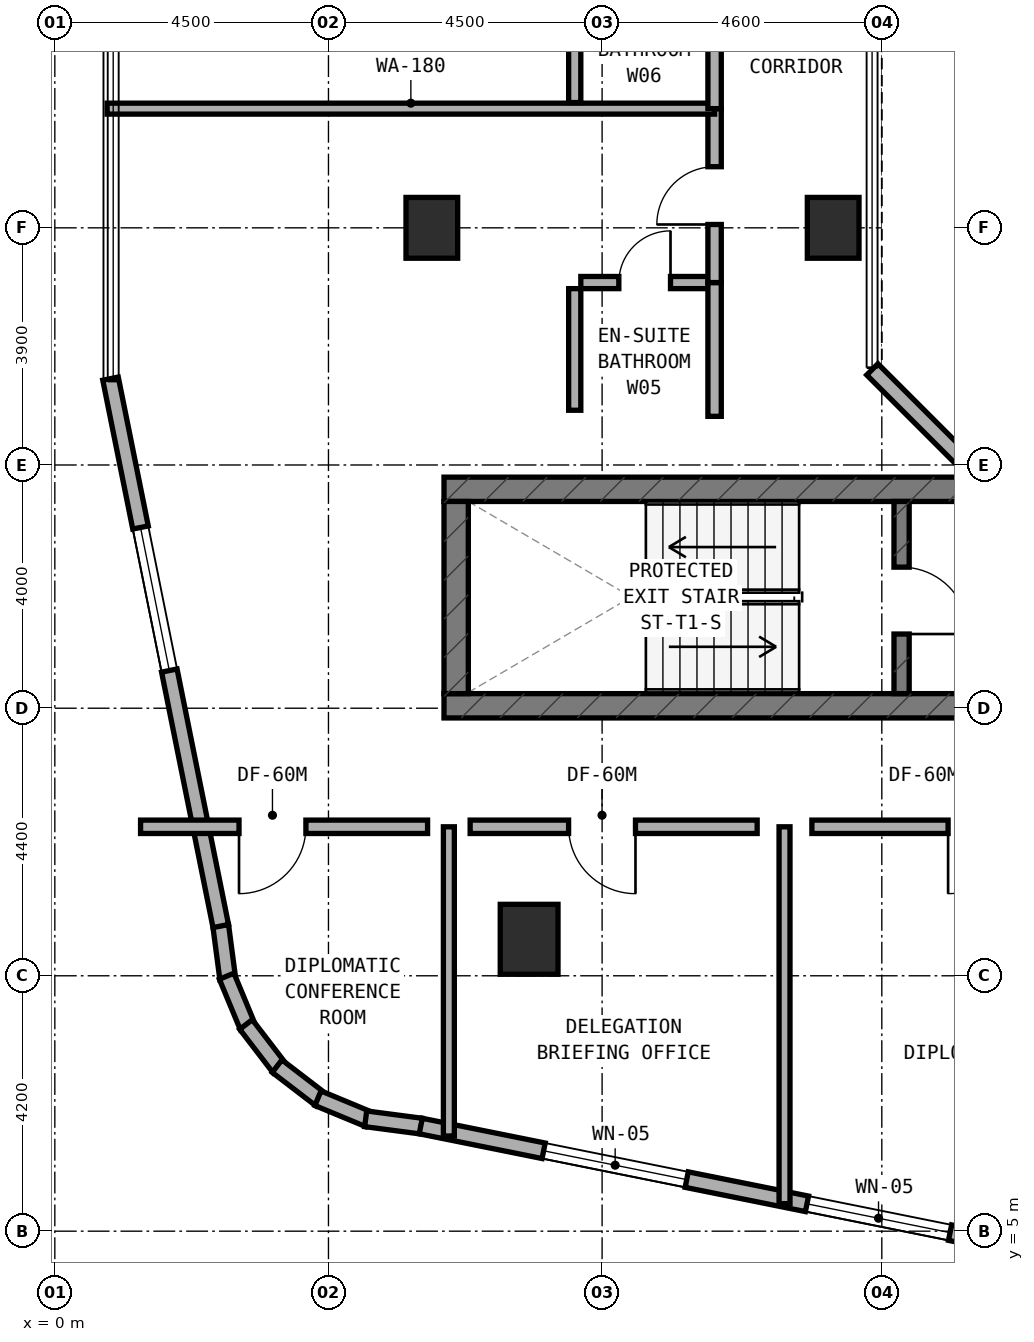
"""IFC4 building model, lengths in metres.
Left out: names, types, materials, properties, quantities, classifications, styles, units other than length and angle.
Written with IfcOpenShell. Run it as: python <this file> out.ifc"""

import sys

from ifc_helpers import new_model, si_unit, direction, frame, frame_2d, origin, origin_2d, place, context, subcontext, project, spatial, rectangle, extrude, element, fill, save


model = new_model("IFC4")
c1 = context("Model", 3, precision=1e-05, world=origin(), true_north=direction((0.0, 1.0)))
c2 = subcontext(c1, "Body", "Model", "MODEL_VIEW")
j1 = project(units=[si_unit("LENGTHUNIT", "METRE"), si_unit("PLANEANGLEUNIT", "RADIAN")], contexts=[c1])
p1 = place(None, origin())
s1 = spatial("IfcSite", under=j1, at=p1, CompositionType="ELEMENT")
p2 = place(p1, origin())
s2 = spatial("IfcBuilding", under=s1, at=p2, CompositionType="ELEMENT")
p3 = place(p2, frame((0.0, 0.0, 109.0)))
s3 = spatial("IfcBuildingStorey", under=s2, at=p3, CompositionType="ELEMENT", Elevation=109.0)
p4 = place(p3, frame((6.4, 13.64, 0.0), z_axis=(0.0, 0.0, 1.0), x_axis=(1.0, 0.0, 0.0)))
e1 = element("IfcWall", 1, at=p4, inside=s3, PredefinedType="SHEAR", context=c2, shape_type="SweptSolid", body=[
    extrude(rectangle(XDim=24.4, YDim=0.4, at=frame_2d((12.2, 0.0))), origin(), (0.0, 0.0, 1.0), 3.5),
])
p5 = place(p4, frame((9.15, 0.0, 0.0)))
e2 = element("IfcOpeningElement", 2, at=p5, cuts=e1, PredefinedType="OPENING", context=c2, shape_type="SweptSolid", body=[
    extrude(rectangle(XDim=1.2, YDim=2.15, at=frame_2d((0.6, 1.075))), frame((0.0, 0.21, 0.0), z_axis=(0.0, -1.0, 0.0), x_axis=(1.0, 0.0, 0.0)), (0.0, 0.0, 1.0), 0.42),
])
p6 = place(p4, frame((16.94, 0.0, 0.0)))
e3 = element("IfcOpeningElement", 3, at=p6, cuts=e1, PredefinedType="OPENING", context=c2, shape_type="SweptSolid", body=[
    extrude(rectangle(XDim=0.85, YDim=2.1, at=frame_2d((0.425, 1.05))), frame((0.0, 0.21, 0.0), z_axis=(0.0, -1.0, 0.0), x_axis=(1.0, 0.0, 0.0)), (0.0, 0.0, 1.0), 0.42),
])
p7 = place(p3, frame((6.4, 17.2, 0.0), z_axis=(0.0, 0.0, 1.0), x_axis=(1.0, 0.0, 0.0)))
e4 = element("IfcWall", 4, at=p7, inside=s3, PredefinedType="SHEAR", context=c2, shape_type="SweptSolid", body=[
    extrude(rectangle(XDim=24.4, YDim=0.4, at=frame_2d((12.2, 0.0))), origin(), (0.0, 0.0, 1.0), 3.5),
])
p8 = place(p3, frame((6.6, 13.84, 0.0), z_axis=(0.0, 0.0, 1.0), x_axis=(0.0, 1.0, 0.0)))
e5 = element("IfcWall", 5, at=p8, inside=s3, PredefinedType="SHEAR", context=c2, shape_type="SweptSolid", body=[
    extrude(rectangle(XDim=3.16, YDim=0.4, at=frame_2d((1.58, 0.0))), origin(), (0.0, 0.0, 1.0), 3.5),
])
p9 = place(p3, frame((13.925, 13.84, 0.0), z_axis=(0.0, 0.0, 1.0), x_axis=(0.0, 1.0, 0.0)))
e6 = element("IfcWall", 6, at=p9, inside=s3, PredefinedType="STANDARD", context=c2, shape_type="SweptSolid", body=[
    extrude(rectangle(XDim=3.16, YDim=0.25, at=frame_2d((1.58, 0.0))), origin(), (0.0, 0.0, 1.0), 3.22),
])
p10 = place(p9, frame((0.98, 0.0, 0.0)))
e7 = element("IfcOpeningElement", 7, at=p10, cuts=e6, PredefinedType="OPENING", context=c2, shape_type="SweptSolid", body=[
    extrude(rectangle(XDim=1.1, YDim=2.15, at=frame_2d((0.55, 1.075))), frame((0.0, 0.135, 0.0), z_axis=(0.0, -1.0, 0.0), x_axis=(1.0, 0.0, 0.0)), (0.0, 0.0, 1.0), 0.27),
])
p11 = place(p3, frame((6.2, 21.5, 0.0), z_axis=(0.0, 0.0, 1.0), x_axis=(1.0, 0.0, 0.0)))
e8 = element("IfcColumn", 8, at=p11, inside=s3, PredefinedType="COLUMN", context=c2, shape_type="SweptSolid", body=[
    extrude(rectangle(XDim=0.85, YDim=1.0, at=origin_2d()), origin(), (0.0, 0.0, 1.0), 3.5),
])
p12 = place(p3, frame((7.8, 9.8, 0.0), z_axis=(0.0, 0.0, 1.0), x_axis=(1.0, 0.0, 0.0)))
e9 = element("IfcColumn", 9, at=p12, inside=s3, PredefinedType="COLUMN", context=c2, shape_type="SweptSolid", body=[
    extrude(rectangle(XDim=0.95, YDim=1.15, at=origin_2d()), origin(), (0.0, 0.0, 1.0), 3.5),
])
p13 = place(p3, frame((12.8, 21.5, 0.0), z_axis=(0.0, 0.0, 1.0), x_axis=(1.0, 0.0, 0.0)))
e10 = element("IfcColumn", 10, at=p13, inside=s3, PredefinedType="COLUMN", context=c2, shape_type="SweptSolid", body=[
    extrude(rectangle(XDim=0.85, YDim=1.0, at=origin_2d()), origin(), (0.0, 0.0, 1.0), 3.5),
])
p14 = place(p3, frame((2.728, 10.025, 0.0), z_axis=(0.0, 0.0, 1.0), x_axis=(0.130953706898, -0.991388484223, 0.0)))
e11 = element("IfcWall", 11, at=p14, inside=s3, PredefinedType="STANDARD", context=c2, shape_type="SweptSolid", body=[
    extrude(rectangle(XDim=0.885, YDim=0.26, at=frame_2d((0.443, 0.0))), origin(), (0.0, 0.0, 1.0), 3.22),
])
p15 = place(p3, frame((2.826, 9.193, 0.0), z_axis=(0.0, 0.0, 1.0), x_axis=(0.383290660547, -0.923627776508, 0.0)))
e12 = element("IfcWall", 12, at=p15, inside=s3, PredefinedType="STANDARD", context=c2, shape_type="SweptSolid", body=[
    extrude(rectangle(XDim=0.903, YDim=0.26, at=frame_2d((0.452, 0.0))), origin(), (0.0, 0.0, 1.0), 3.22),
])
p16 = place(p3, frame((3.144, 8.399, 0.0), z_axis=(0.0, 0.0, 1.0), x_axis=(0.608624690463, -0.793458244748, 0.0)))
e13 = element("IfcWall", 13, at=p16, inside=s3, PredefinedType="STANDARD", context=c2, shape_type="SweptSolid", body=[
    extrude(rectangle(XDim=0.902, YDim=0.26, at=frame_2d((0.451, 0.0))), origin(), (0.0, 0.0, 1.0), 3.22),
])
p17 = place(p3, frame((3.655, 7.714, 0.0), z_axis=(0.0, 0.0, 1.0), x_axis=(0.793558456666, -0.608494022858, 0.0)))
e14 = element("IfcWall", 14, at=p17, inside=s3, PredefinedType="STANDARD", context=c2, shape_type="SweptSolid", body=[
    extrude(rectangle(XDim=0.902, YDim=0.26, at=frame_2d((0.451, 0.0))), origin(), (0.0, 0.0, 1.0), 3.22),
])
p18 = place(p3, frame((4.327, 7.186, 0.0), z_axis=(0.0, 0.0, 1.0), x_axis=(0.923683767999, -0.383155708213, 0.0)))
e15 = element("IfcWall", 15, at=p18, inside=s3, PredefinedType="STANDARD", context=c2, shape_type="SweptSolid", body=[
    extrude(rectangle(XDim=0.903, YDim=0.26, at=frame_2d((0.451, 0.0))), origin(), (0.0, 0.0, 1.0), 3.22),
])
p19 = place(p3, frame((5.112, 6.848, 0.0), z_axis=(0.0, 0.0, 1.0), x_axis=(0.991487658083, -0.130200706103, 0.0)))
e16 = element("IfcWall", 16, at=p19, inside=s3, PredefinedType="STANDARD", context=c2, shape_type="SweptSolid", body=[
    extrude(rectangle(XDim=0.921, YDim=0.26, at=frame_2d((0.46, 0.0))), origin(), (0.0, 0.0, 1.0), 3.22),
])
p20 = place(p3, frame((6.018, 6.729, 0.0), z_axis=(0.0, 0.0, 1.0), x_axis=(0.980315963543, -0.197435082048, 0.0)))
e17 = element("IfcWall", 17, at=p20, inside=s3, PredefinedType="STANDARD", context=c2, shape_type="SweptSolid", body=[
    extrude(rectangle(XDim=9.183, YDim=0.26, at=frame_2d((4.591, 0.0))), origin(), (0.0, 0.0, 1.0), 3.22),
])
p21 = place(p20, frame((2.061, 0.0, 0.8)))
e18 = element("IfcOpeningElement", 18, at=p21, cuts=e17, PredefinedType="OPENING", context=c2, shape_type="SweptSolid", body=[
    extrude(rectangle(XDim=2.4, YDim=1.6, at=frame_2d((1.2, 0.8))), frame((0.0, 0.14, 0.0), z_axis=(0.0, -1.0, 0.0), x_axis=(1.0, 0.0, 0.0)), (0.0, 0.0, 1.0), 0.28),
])
p22 = place(p20, frame((6.479, 0.0, 0.8)))
e19 = element("IfcOpeningElement", 19, at=p22, cuts=e17, PredefinedType="OPENING", context=c2, shape_type="SweptSolid", body=[
    extrude(rectangle(XDim=2.4, YDim=1.6, at=frame_2d((1.2, 0.8))), frame((0.0, 0.14, 0.0), z_axis=(0.0, -1.0, 0.0), x_axis=(1.0, 0.0, 0.0)), (0.0, 0.0, 1.0), 0.28),
])
p23 = place(p3, frame((0.916, 19.02, 0.0), z_axis=(0.0, 0.0, 1.0), x_axis=(0.197435082048, -0.980315963543, 0.0)))
e20 = element("IfcWall", 20, at=p23, inside=s3, PredefinedType="STANDARD", context=c2, shape_type="SweptSolid", body=[
    extrude(rectangle(XDim=9.183, YDim=0.26, at=frame_2d((4.591, 0.0))), origin(), (0.0, 0.0, 1.0), 3.22),
])
p24 = place(p23, frame((2.497, 0.0, 0.8)))
e21 = element("IfcOpeningElement", 21, at=p24, cuts=e20, PredefinedType="OPENING", context=c2, shape_type="SweptSolid", body=[
    extrude(rectangle(XDim=2.4, YDim=1.6, at=frame_2d((1.2, 0.8))), frame((0.0, 0.14, 0.0), z_axis=(0.0, -1.0, 0.0), x_axis=(1.0, 0.0, 0.0)), (0.0, 0.0, 1.0), 0.28),
])
p25 = place(p3, frame((13.444, 19.172, 0.0), z_axis=(0.0, 0.0, 1.0), x_axis=(0.707059717605, -0.707153841636, 0.0)))
e22 = element("IfcWall", 22, at=p25, inside=s3, PredefinedType="STANDARD", context=c2, shape_type="SweptSolid", body=[
    extrude(rectangle(XDim=2.594, YDim=0.26, at=frame_2d((1.297, 0.0))), origin(), (0.0, 0.0, 1.0), 3.22),
])
p26 = place(p3, frame((6.48, 6.565, 0.0), z_axis=(0.0, 0.0, 1.0), x_axis=(0.0, 1.0, 0.0)))
e23 = element("IfcWall", 23, at=p26, inside=s3, PredefinedType="SOLIDWALL", context=c2, shape_type="SweptSolid", body=[
    extrude(rectangle(XDim=5.085, YDim=0.18, at=frame_2d((2.542, 0.0))), origin(), (0.0, 0.0, 1.0), 3.22),
])
p27 = place(p3, frame((1.41, 11.65, 0.0), z_axis=(0.0, 0.0, 1.0), x_axis=(1.0, 0.0, 0.0)))
e24 = element("IfcWall", 24, at=p27, inside=s3, PredefinedType="SOLIDWALL", context=c2, shape_type="SweptSolid", body=[
    extrude(rectangle(XDim=4.72, YDim=0.22, at=frame_2d((2.36, 0.0))), origin(), (0.0, 0.0, 1.0), 3.22),
])
p28 = place(p27, frame((1.619, 0.0, 0.0)))
e25 = element("IfcOpeningElement", 25, at=p28, cuts=e24, PredefinedType="OPENING", context=c2, shape_type="SweptSolid", body=[
    extrude(rectangle(XDim=1.1, YDim=2.1, at=frame_2d((0.55, 1.05))), frame((0.0, 0.12, 0.0), z_axis=(0.0, -1.0, 0.0), x_axis=(1.0, 0.0, 0.0)), (0.0, 0.0, 1.0), 0.24),
])
p29 = place(p3, frame((6.83, 11.65, 0.0), z_axis=(0.0, 0.0, 1.0), x_axis=(1.0, 0.0, 0.0)))
e26 = element("IfcWall", 26, at=p29, inside=s3, PredefinedType="SOLIDWALL", context=c2, shape_type="SweptSolid", body=[
    extrude(rectangle(XDim=4.72, YDim=0.22, at=frame_2d((2.36, 0.0))), origin(), (0.0, 0.0, 1.0), 2.595),
])
p30 = place(p29, frame((1.619, 0.0, 0.0)))
e27 = element("IfcOpeningElement", 27, at=p30, cuts=e26, PredefinedType="OPENING", context=c2, shape_type="SweptSolid", body=[
    extrude(rectangle(XDim=1.1, YDim=2.1, at=frame_2d((0.55, 1.05))), frame((0.0, 0.12, 0.0), z_axis=(0.0, -1.0, 0.0), x_axis=(1.0, 0.0, 0.0)), (0.0, 0.0, 1.0), 0.24),
])
p31 = place(p3, frame((12.0, 5.453, 0.0), z_axis=(0.0, 0.0, 1.0), x_axis=(0.0, 1.0, 0.0)))
e28 = element("IfcWall", 28, at=p31, inside=s3, PredefinedType="SOLIDWALL", context=c2, shape_type="SweptSolid", body=[
    extrude(rectangle(XDim=6.197, YDim=0.18, at=frame_2d((3.099, 0.0))), origin(), (0.0, 0.0, 1.0), 2.835),
])
p32 = place(p3, frame((12.45, 11.65, 0.0), z_axis=(0.0, 0.0, 1.0), x_axis=(1.0, 0.0, 0.0)))
e29 = element("IfcWall", 29, at=p32, inside=s3, PredefinedType="SOLIDWALL", context=c2, shape_type="SweptSolid", body=[
    extrude(rectangle(XDim=6.1, YDim=0.22, at=frame_2d((3.05, 0.0))), origin(), (0.0, 0.0, 1.0), 2.595),
])
p33 = place(p32, frame((2.24, 0.0, 0.0)))
e30 = element("IfcOpeningElement", 30, at=p33, cuts=e29, PredefinedType="OPENING", context=c2, shape_type="SweptSolid", body=[
    extrude(rectangle(XDim=1.1, YDim=2.1, at=frame_2d((0.55, 1.05))), frame((0.0, 0.12, 0.0), z_axis=(0.0, -1.0, 0.0), x_axis=(1.0, 0.0, 0.0)), (0.0, 0.0, 1.0), 0.24),
])
p34 = place(p3, frame((8.65, 20.6, 0.0), z_axis=(0.0, 0.0, 1.0), x_axis=(1.0, 0.0, 0.0)))
e31 = element("IfcWall", 31, at=p34, inside=s3, PredefinedType="PLUMBINGWALL", context=c2, shape_type="SweptSolid", body=[
    extrude(rectangle(XDim=2.1, YDim=0.2, at=frame_2d((1.05, 0.0))), origin(), (0.0, 0.0, 1.0), 3.22),
])
p35 = place(p34, frame((0.625, 0.0, 0.0)))
e32 = element("IfcOpeningElement", 32, at=p35, cuts=e31, PredefinedType="OPENING", context=c2, shape_type="SweptSolid", body=[
    extrude(rectangle(XDim=0.85, YDim=2.1, at=frame_2d((0.425, 1.05))), frame((0.0, 0.11, 0.0), z_axis=(0.0, -1.0, 0.0), x_axis=(1.0, 0.0, 0.0)), (0.0, 0.0, 1.0), 0.22),
])
p36 = place(p3, frame((8.55, 18.5, 0.0), z_axis=(0.0, 0.0, 1.0), x_axis=(0.0, 1.0, 0.0)))
e33 = element("IfcWall", 33, at=p36, inside=s3, PredefinedType="PLUMBINGWALL", context=c2, shape_type="SweptSolid", body=[
    extrude(rectangle(XDim=2.0, YDim=0.2, at=frame_2d((1.0, 0.0))), origin(), (0.0, 0.0, 1.0), 3.22),
])
p37 = place(p3, frame((10.85, 18.4, 0.0), z_axis=(0.0, 0.0, 1.0), x_axis=(0.0, 1.0, 0.0)))
e34 = element("IfcWall", 34, at=p37, inside=s3, PredefinedType="SOLIDWALL", context=c2, shape_type="SweptSolid", body=[
    extrude(rectangle(XDim=2.2, YDim=0.22, at=frame_2d((1.1, 0.0))), origin(), (0.0, 0.0, 1.0), 3.22),
])
p38 = place(p3, frame((10.85, 20.6, 0.0), z_axis=(0.0, 0.0, 1.0), x_axis=(0.0, 1.0, 0.0)))
e35 = element("IfcWall", 35, at=p38, inside=s3, PredefinedType="SOLIDWALL", context=c2, shape_type="SweptSolid", body=[
    extrude(rectangle(XDim=2.86, YDim=0.22, at=frame_2d((1.43, 0.0))), origin(), (0.0, 0.0, 1.0), 2.595),
])
p39 = place(p38, frame((0.955, 0.0, 0.0)))
e36 = element("IfcOpeningElement", 36, at=p39, cuts=e35, PredefinedType="OPENING", context=c2, shape_type="SweptSolid", body=[
    extrude(rectangle(XDim=0.95, YDim=2.1, at=frame_2d((0.475, 1.05))), frame((0.0, 0.12, 0.0), z_axis=(0.0, -1.0, 0.0), x_axis=(1.0, 0.0, 0.0)), (0.0, 0.0, 1.0), 0.24),
])
p40 = place(p3, frame((0.86, 23.46, 0.0), z_axis=(0.0, 0.0, 1.0), x_axis=(1.0, 0.0, 0.0)))
e37 = element("IfcWall", 37, at=p40, inside=s3, PredefinedType="SOLIDWALL", context=c2, shape_type="SweptSolid", body=[
    extrude(rectangle(XDim=9.99, YDim=0.18, at=frame_2d((4.995, 0.0))), origin(), (0.0, 0.0, 1.0), 2.835),
])
p41 = place(p3, frame((8.55, 23.56, 0.0), z_axis=(0.0, 0.0, 1.0), x_axis=(0.0, 1.0, 0.0)))
e38 = element("IfcWall", 38, at=p41, inside=s3, PredefinedType="PLUMBINGWALL", context=c2, shape_type="SweptSolid", body=[
    extrude(rectangle(XDim=2.0, YDim=0.2, at=frame_2d((1.0, 0.0))), origin(), (0.0, 0.0, 1.0), 3.22),
])
p42 = place(p3, frame((10.85, 23.46, 0.0), z_axis=(0.0, 0.0, 1.0), x_axis=(0.0, 1.0, 0.0)))
e39 = element("IfcWall", 39, at=p42, inside=s3, PredefinedType="SOLIDWALL", context=c2, shape_type="SweptSolid", body=[
    extrude(rectangle(XDim=2.2, YDim=0.22, at=frame_2d((1.1, 0.0))), origin(), (0.0, 0.0, 1.0), 3.22),
])
p43 = place(p21, origin())
e40 = element("IfcWindow", 40, at=p43, inside=s3, PartitioningType="SINGLE_PANEL", PredefinedType="WINDOW", context=c2, shape_type="SweptSolid", body=[
    extrude(rectangle(XDim=2.4, YDim=1.6, at=frame_2d((1.2, 0.8))), frame((0.0, 0.03, 0.0), z_axis=(0.0, -1.0, 0.0), x_axis=(1.0, 0.0, 0.0)), (0.0, 0.0, 1.0), 0.06),
])
fill(e18, e40)
p44 = place(p22, origin())
e41 = element("IfcWindow", 41, at=p44, inside=s3, PartitioningType="SINGLE_PANEL", PredefinedType="WINDOW", context=c2, shape_type="SweptSolid", body=[
    extrude(rectangle(XDim=2.4, YDim=1.6, at=frame_2d((1.2, 0.8))), frame((0.0, 0.03, 0.0), z_axis=(0.0, -1.0, 0.0), x_axis=(1.0, 0.0, 0.0)), (0.0, 0.0, 1.0), 0.06),
])
fill(e19, e41)
p45 = place(p24, origin())
e42 = element("IfcWindow", 42, at=p45, inside=s3, PartitioningType="SINGLE_PANEL", PredefinedType="WINDOW", context=c2, shape_type="SweptSolid", body=[
    extrude(rectangle(XDim=2.4, YDim=1.6, at=frame_2d((1.2, 0.8))), frame((0.0, 0.03, 0.0), z_axis=(0.0, -1.0, 0.0), x_axis=(1.0, 0.0, 0.0)), (0.0, 0.0, 1.0), 0.06),
])
fill(e21, e42)
p46 = place(p10, frame((1.1, 0.0, 0.0), z_axis=(0.0, 0.0, 1.0), x_axis=(-1.0, 0.0, 0.0)))
e43 = element("IfcDoor", 43, at=p46, inside=s3, OperationType="SINGLE_SWING_RIGHT", PredefinedType="DOOR", context=c2, shape_type="SweptSolid", body=[
    extrude(rectangle(XDim=1.1, YDim=2.15, at=frame_2d((0.55, 1.075))), frame((0.0, 0.025, 0.0), z_axis=(0.0, -1.0, 0.0), x_axis=(1.0, 0.0, 0.0)), (0.0, 0.0, 1.0), 0.05),
])
fill(e7, e43)
p47 = place(p28, frame((1.1, 0.0, 0.0), z_axis=(0.0, 0.0, 1.0), x_axis=(-1.0, 0.0, 0.0)))
e44 = element("IfcDoor", 44, at=p47, inside=s3, OperationType="SINGLE_SWING_RIGHT", PredefinedType="DOOR", context=c2, shape_type="SweptSolid", body=[
    extrude(rectangle(XDim=1.1, YDim=2.1, at=frame_2d((0.55, 1.05))), frame((0.0, 0.025, 0.0), z_axis=(0.0, -1.0, 0.0), x_axis=(1.0, 0.0, 0.0)), (0.0, 0.0, 1.0), 0.05),
])
fill(e25, e44)
p48 = place(p30, frame((1.1, 0.0, 0.0), z_axis=(0.0, 0.0, 1.0), x_axis=(-1.0, 0.0, 0.0)))
e45 = element("IfcDoor", 45, at=p48, inside=s3, OperationType="SINGLE_SWING_LEFT", PredefinedType="DOOR", context=c2, shape_type="SweptSolid", body=[
    extrude(rectangle(XDim=1.1, YDim=2.1, at=frame_2d((0.55, 1.05))), frame((0.0, 0.025, 0.0), z_axis=(0.0, -1.0, 0.0), x_axis=(1.0, 0.0, 0.0)), (0.0, 0.0, 1.0), 0.05),
])
fill(e27, e45)
p49 = place(p33, frame((1.1, 0.0, 0.0), z_axis=(0.0, 0.0, 1.0), x_axis=(-1.0, 0.0, 0.0)))
e46 = element("IfcDoor", 46, at=p49, inside=s3, OperationType="SINGLE_SWING_RIGHT", PredefinedType="DOOR", context=c2, shape_type="SweptSolid", body=[
    extrude(rectangle(XDim=1.1, YDim=2.1, at=frame_2d((0.55, 1.05))), frame((0.0, 0.025, 0.0), z_axis=(0.0, -1.0, 0.0), x_axis=(1.0, 0.0, 0.0)), (0.0, 0.0, 1.0), 0.05),
])
fill(e30, e46)
p50 = place(p35, origin())
e47 = element("IfcDoor", 47, at=p50, inside=s3, OperationType="SINGLE_SWING_RIGHT", PredefinedType="DOOR", context=c2, shape_type="SweptSolid", body=[
    extrude(rectangle(XDim=0.85, YDim=2.1, at=frame_2d((0.425, 1.05))), frame((0.0, 0.025, 0.0), z_axis=(0.0, -1.0, 0.0), x_axis=(1.0, 0.0, 0.0)), (0.0, 0.0, 1.0), 0.05),
])
fill(e32, e47)
p51 = place(p39, origin())
e48 = element("IfcDoor", 48, at=p51, inside=s3, OperationType="SINGLE_SWING_LEFT", PredefinedType="DOOR", context=c2, shape_type="SweptSolid", body=[
    extrude(rectangle(XDim=0.95, YDim=2.1, at=frame_2d((0.475, 1.05))), frame((0.0, 0.025, 0.0), z_axis=(0.0, -1.0, 0.0), x_axis=(1.0, 0.0, 0.0)), (0.0, 0.0, 1.0), 0.05),
])
fill(e36, e48)
save(model, sys.argv[1])
